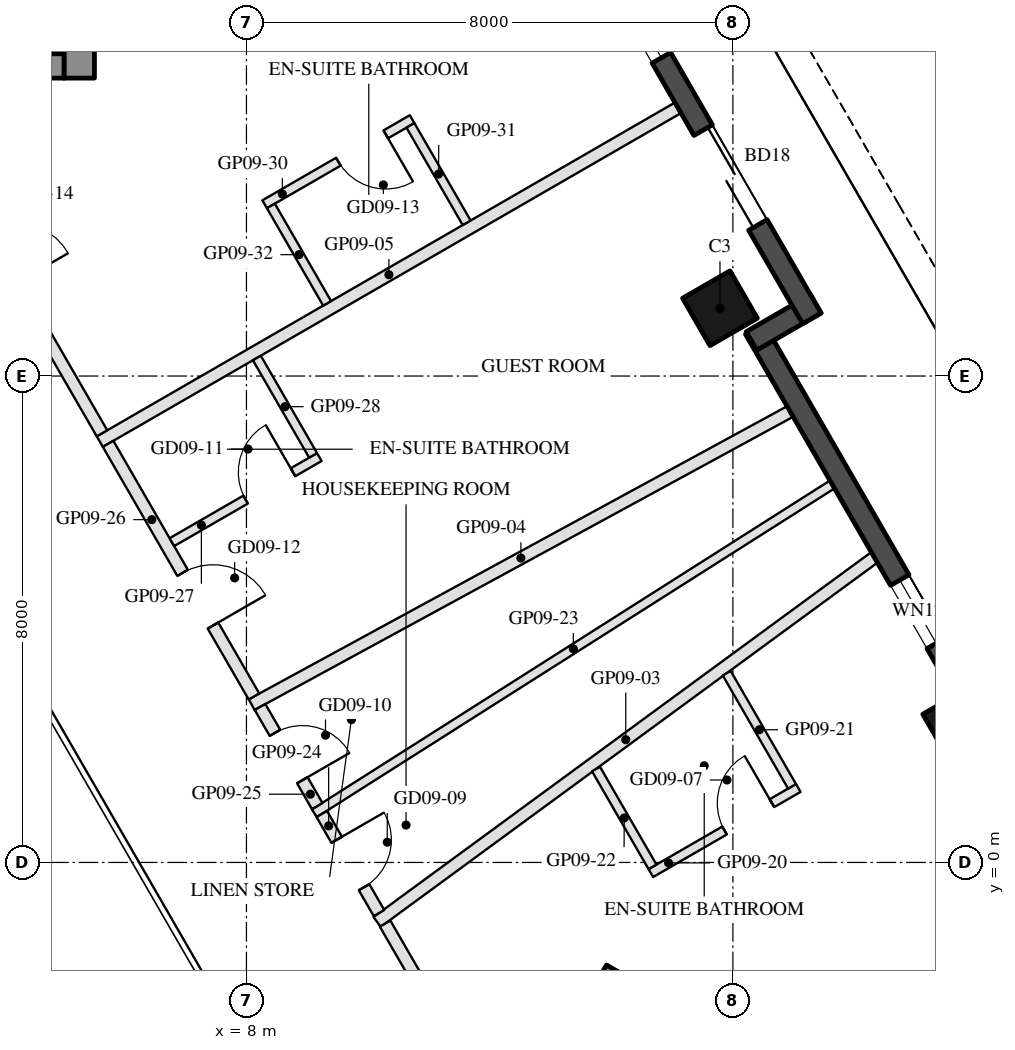
"""IFC4 building model, lengths in metres.
Left out: names, types, materials, properties, quantities, classifications, styles, units other than length and angle.
Written with IfcOpenShell. Run it as: python <this file> out.ifc"""

import sys

from ifc_helpers import new_model, si_unit, direction, frame, frame_2d, origin, origin_2d, place, context, subcontext, project, spatial, rectangle, hollow_rectangle, extrude, element, fill, save


model = new_model("IFC4")
c1 = context("Model", 3, precision=1e-05, world=origin(), true_north=direction((0.0, 1.0)))
c2 = subcontext(c1, "Body", "Model", "MODEL_VIEW")
j1 = project(units=[si_unit("LENGTHUNIT", "METRE"), si_unit("PLANEANGLEUNIT", "RADIAN")], contexts=[c1])
p1 = place(None, origin())
s1 = spatial("IfcSite", under=j1, at=p1, CompositionType="ELEMENT")
p2 = place(p1, origin())
s2 = spatial("IfcBuilding", under=s1, at=p2, CompositionType="ELEMENT")
p3 = place(p2, frame((0.0, 0.0, 109.4)))
s3 = spatial("IfcBuildingStorey", under=s2, at=p3, CompositionType="ELEMENT", Elevation=109.4)
for number, where, z_axis, x_axis in (
    (1, (19.738, 2.273, 0.0), (0.0, 0.0, 1.0), (-0.5, 0.866, 0.0)),
    (2, (15.788, 9.115, 0.0), (0.0, 0.0, 1.0), (-0.5, 0.866, 0.0)),
):
    element("IfcColumn", number, at=place(p3, frame(where, z_axis=z_axis, x_axis=x_axis)), inside=s3, PredefinedType="COLUMN", context=c2, shape_type="SweptSolid", body=[
        extrude(hollow_rectangle(XDim=0.9, YDim=0.9, WallThickness=0.04, at=origin_2d()), origin(), (0.0, 0.0, 1.0), 3.7),
    ])
p4 = place(p3, frame((19.729, 2.938, 0.0), z_axis=(0.0, 0.0, 1.0), x_axis=(-0.499976430342, 0.866039011305, 0.0)))
e3 = element("IfcWall", 3, at=p4, inside=s3, PredefinedType="SOLIDWALL", context=c2, shape_type="SweptSolid", body=[
    extrude(rectangle(XDim=6.74, YDim=0.35, at=frame_2d((3.37, 0.0))), origin(), (0.0, 0.0, 1.0), 3.55),
])
p5 = place(p4, frame((0.77, 0.0, 0.3)))
e4 = element("IfcOpeningElement", 4, at=p5, cuts=e3, PredefinedType="OPENING", context=c2, shape_type="SweptSolid", body=[
    extrude(rectangle(XDim=1.2, YDim=2.65, at=frame_2d((0.6, 1.325))), frame((0.0, 0.185, 0.0), z_axis=(0.0, -1.0, 0.0), x_axis=(1.0, 0.0, 0.0)), (0.0, 0.0, 1.0), 0.37),
])
p6 = place(p3, frame((16.306, 8.577, 0.0), z_axis=(0.0, 0.0, 1.0), x_axis=(0.866092288191, 0.499884134912, 0.0)))
e5 = element("IfcWall", 5, at=p6, inside=s3, PredefinedType="SOLIDWALL", context=c2, shape_type="SweptSolid", body=[
    extrude(rectangle(XDim=1.22, YDim=0.35, at=frame_2d((0.61, 0.0))), origin(), (0.0, 0.0, 1.0), 3.55),
])
p7 = place(p3, frame((17.299, 8.948, 0.0), z_axis=(0.0, 0.0, 1.0), x_axis=(-0.500010041276, 0.866019606374, 0.0)))
e6 = element("IfcWall", 6, at=p7, inside=s3, PredefinedType="SOLIDWALL", context=c2, shape_type="SweptSolid", body=[
    extrude(rectangle(XDim=9.7, YDim=0.35, at=frame_2d((4.85, 0.0))), origin(), (0.0, 0.0, 1.0), 3.55),
])
p8 = place(p7, frame((1.775, 0.0, 0.0)))
e7 = element("IfcOpeningElement", 7, at=p8, cuts=e6, PredefinedType="OPENING", context=c2, shape_type="SweptSolid", body=[
    extrude(rectangle(XDim=1.8, YDim=2.4, at=frame_2d((0.9, 1.2))), frame((0.0, 0.185, 0.0), z_axis=(0.0, -1.0, 0.0), x_axis=(1.0, 0.0, 0.0)), (0.0, 0.0, 1.0), 0.37),
])
p9 = place(p7, frame((4.949, 0.0, 0.3)))
e8 = element("IfcOpeningElement", 8, at=p9, cuts=e6, PredefinedType="OPENING", context=c2, shape_type="SweptSolid", body=[
    extrude(rectangle(XDim=3.0, YDim=2.65, at=frame_2d((1.5, 1.325))), frame((0.0, 0.185, 0.0), z_axis=(0.0, -1.0, 0.0), x_axis=(1.0, 0.0, 0.0)), (0.0, 0.0, 1.0), 0.37),
])
p10 = place(p3, frame((5.25, 12.9, 0.0), z_axis=(0.0, 0.0, 1.0), x_axis=(0.0, 1.0, 0.0)))
e9 = element("IfcWall", 9, at=p10, inside=s3, PredefinedType="SHEAR", context=c2, shape_type="SweptSolid", body=[
    extrude(rectangle(XDim=14.837, YDim=0.5, at=frame_2d((7.418, 0.0))), origin(), (0.0, 0.0, 1.0), 3.5),
])
p11 = place(p3, frame((5.0, 13.1, 0.0), z_axis=(0.0, 0.0, 1.0), x_axis=(-1.0, 0.0, 0.0)))
e10 = element("IfcWall", 10, at=p11, inside=s3, PredefinedType="SHEAR", context=c2, shape_type="SweptSolid", body=[
    extrude(rectangle(XDim=10.0, YDim=0.4, at=frame_2d((5.0, 0.0))), origin(), (0.0, 0.0, 1.0), 3.5),
])
p12 = place(p11, frame((3.55, 0.0, 0.0)))
e11 = element("IfcOpeningElement", 11, at=p12, cuts=e10, PredefinedType="OPENING", context=c2, shape_type="SweptSolid", body=[
    extrude(rectangle(XDim=1.1, YDim=2.1, at=frame_2d((0.55, 1.05))), frame((0.0, 0.21, 0.0), z_axis=(0.0, -1.0, 0.0), x_axis=(1.0, 0.0, 0.0)), (0.0, 0.0, 1.0), 0.42),
])
p13 = place(p11, frame((5.85, 0.0, 0.0)))
e12 = element("IfcOpeningElement", 12, at=p13, cuts=e10, PredefinedType="OPENING", context=c2, shape_type="SweptSolid", body=[
    extrude(rectangle(XDim=1.4, YDim=2.1, at=frame_2d((0.7, 1.05))), frame((0.0, 0.21, 0.0), z_axis=(0.0, -1.0, 0.0), x_axis=(1.0, 0.0, 0.0)), (0.0, 0.0, 1.0), 0.42),
])
p14 = place(p3, frame((13.797, -1.903, 0.0), z_axis=(0.0, 0.0, 1.0), x_axis=(0.866025009528, -0.500000682871, 0.0)))
e13 = element("IfcWall", 13, at=p14, inside=s3, PredefinedType="SHEAR", context=c2, shape_type="SweptSolid", body=[
    extrude(rectangle(XDim=14.837, YDim=0.5, at=frame_2d((7.418, 0.0))), origin(), (0.0, 0.0, 1.0), 3.5),
])
p15 = place(p3, frame((18.327, 5.017, 0.0), z_axis=(0.0, 0.0, 1.0), x_axis=(-0.806479235934, -0.59126241383, 0.0)))
e14 = element("IfcWall", 14, at=p15, inside=s3, PredefinedType="PARTITIONING", context=c2, shape_type="SweptSolid", body=[
    extrude(rectangle(XDim=10.14, YDim=0.2, at=frame_2d((5.07, 0.0))), origin(), (0.0, 0.0, 1.0), 2.96),
])
p16 = place(p3, frame((16.941, 7.417, 0.0), z_axis=(0.0, 0.0, 1.0), x_axis=(-0.878270052011, -0.478164946164, 0.0)))
e15 = element("IfcWall", 15, at=p16, inside=s3, PredefinedType="PARTITIONING", context=c2, shape_type="SweptSolid", body=[
    extrude(rectangle(XDim=10.083, YDim=0.2, at=frame_2d((5.042, 0.0))), origin(), (0.0, 0.0, 1.0), 2.96),
])
p17 = place(p3, frame((15.097, 12.411, 0.0), z_axis=(0.0, 0.0, 1.0), x_axis=(-0.866027479907, -0.499996404033, 0.0)))
e16 = element("IfcWall", 16, at=p17, inside=s3, PredefinedType="PARTITIONING", context=c2, shape_type="SweptSolid", body=[
    extrude(rectangle(XDim=10.98, YDim=0.2, at=frame_2d((5.49, 0.0))), origin(), (0.0, 0.0, 1.0), 2.96),
])
p18 = place(p3, frame((10.281, -1.006, 0.0), z_axis=(0.0, 0.0, 1.0), x_axis=(0.499995262016, -0.866028139243, 0.0)))
e17 = element("IfcWall", 17, at=p18, inside=s3, PredefinedType="PARTITIONING", context=c2, shape_type="SweptSolid", body=[
    extrude(rectangle(XDim=3.977, YDim=0.2, at=frame_2d((1.988, 0.0))), origin(), (0.0, 0.0, 1.0), 2.95),
])
p19 = place(p18, frame((1.488, 0.0, 0.0)))
e18 = element("IfcOpeningElement", 18, at=p19, cuts=e17, PredefinedType="OPENING", context=c2, shape_type="SweptSolid", body=[
    extrude(rectangle(XDim=1.0, YDim=2.1, at=frame_2d((0.5, 1.05))), frame((0.0, 0.11, 0.0), z_axis=(0.0, -1.0, 0.0), x_axis=(1.0, 0.0, 0.0)), (0.0, 0.0, 1.0), 0.22),
])
p20 = place(p3, frame((14.65, -0.175, 0.0), z_axis=(0.0, 0.0, 1.0), x_axis=(0.866034573852, 0.49998411664, 0.0)))
e19 = element("IfcWall", 19, at=p20, inside=s3, PredefinedType="PARTITIONING", context=c2, shape_type="SweptSolid", body=[
    extrude(rectangle(XDim=2.8, YDim=0.15, at=frame_2d((1.4, 0.0))), origin(), (0.0, 0.0, 1.0), 3.55),
])
p21 = place(p20, frame((1.4, 0.0, 0.0)))
e20 = element("IfcOpeningElement", 20, at=p21, cuts=e19, PredefinedType="OPENING", context=c2, shape_type="SweptSolid", body=[
    extrude(rectangle(XDim=0.9, YDim=2.1, at=frame_2d((0.45, 1.05))), frame((0.0, 0.085, 0.0), z_axis=(0.0, -1.0, 0.0), x_axis=(1.0, 0.0, 0.0)), (0.0, 0.0, 1.0), 0.17),
])
p22 = place(p3, frame((16.973, 1.252, 0.0), z_axis=(0.0, 0.0, 1.0), x_axis=(-0.499965131781, 0.866045534024, 0.0)))
e21 = element("IfcWall", 21, at=p22, inside=s3, PredefinedType="PARTITIONING", context=c2, shape_type="SweptSolid", body=[
    extrude(rectangle(XDim=2.148, YDim=0.15, at=frame_2d((1.074, 0.0))), origin(), (0.0, 0.0, 1.0), 3.55),
])
p23 = place(p3, frame((14.678, -0.073, 0.0), z_axis=(0.0, 0.0, 1.0), x_axis=(-0.499968895414, 0.866043361281, 0.0)))
e22 = element("IfcWall", 22, at=p23, inside=s3, PredefinedType="PARTITIONING", context=c2, shape_type="SweptSolid", body=[
    extrude(rectangle(XDim=1.858, YDim=0.15, at=frame_2d((0.929, 0.0))), origin(), (0.0, 0.0, 1.0), 3.55),
])
p24 = place(p3, frame((17.634, 6.217, 0.0), z_axis=(0.0, 0.0, 1.0), x_axis=(-0.844171272136, -0.536073561463, 0.0)))
e23 = element("IfcWall", 23, at=p24, inside=s3, PredefinedType="PARTITIONING", context=c2, shape_type="SweptSolid", body=[
    extrude(rectangle(XDim=10.089, YDim=0.15, at=frame_2d((5.044, 0.0))), origin(), (0.0, 0.0, 1.0), 2.95),
])
p25 = place(p3, frame((9.239, 0.797, 0.0), z_axis=(0.0, 0.0, 1.0), x_axis=(0.499992114976, -0.866029956157, 0.0)))
e24 = element("IfcWall", 24, at=p25, inside=s3, PredefinedType="PARTITIONING", context=c2, shape_type="SweptSolid", body=[
    extrude(rectangle(XDim=1.881, YDim=0.2, at=frame_2d((0.94, 0.0))), origin(), (0.0, 0.0, 1.0), 2.95),
])
p26 = place(p25, frame((0.49, 0.0, 0.0)))
e25 = element("IfcOpeningElement", 25, at=p26, cuts=e24, PredefinedType="OPENING", context=c2, shape_type="SweptSolid", body=[
    extrude(rectangle(XDim=0.9, YDim=2.1, at=frame_2d((0.45, 1.05))), frame((0.0, 0.11, 0.0), z_axis=(0.0, -1.0, 0.0), x_axis=(1.0, 0.0, 0.0)), (0.0, 0.0, 1.0), 0.22),
])
p27 = place(p3, frame((8.223, 2.557, 0.0), z_axis=(0.0, 0.0, 1.0), x_axis=(0.500018191375, -0.866014900734, 0.0)))
e26 = element("IfcWall", 26, at=p27, inside=s3, PredefinedType="PARTITIONING", context=c2, shape_type="SweptSolid", body=[
    extrude(rectangle(XDim=1.882, YDim=0.2, at=frame_2d((0.941, 0.0))), origin(), (0.0, 0.0, 1.0), 3.55),
])
p28 = place(p27, frame((0.491, 0.0, 0.0)))
e27 = element("IfcOpeningElement", 27, at=p28, cuts=e26, PredefinedType="OPENING", context=c2, shape_type="SweptSolid", body=[
    extrude(rectangle(XDim=0.9, YDim=2.1, at=frame_2d((0.45, 1.05))), frame((0.0, 0.11, 0.0), z_axis=(0.0, -1.0, 0.0), x_axis=(1.0, 0.0, 0.0)), (0.0, 0.0, 1.0), 0.22),
])
p29 = place(p3, frame((5.725, 6.885, 0.0), z_axis=(0.0, 0.0, 1.0), x_axis=(0.499986760557, -0.866033047446, 0.0)))
e28 = element("IfcWall", 28, at=p29, inside=s3, PredefinedType="PARTITIONING", context=c2, shape_type="SweptSolid", body=[
    extrude(rectangle(XDim=4.798, YDim=0.2, at=frame_2d((2.399, 0.0))), origin(), (0.0, 0.0, 1.0), 2.95),
])
p30 = place(p29, frame((2.45, 0.0, 0.0)))
e29 = element("IfcOpeningElement", 29, at=p30, cuts=e28, PredefinedType="OPENING", context=c2, shape_type="SweptSolid", body=[
    extrude(rectangle(XDim=1.0, YDim=2.1, at=frame_2d((0.5, 1.05))), frame((0.0, 0.11, 0.0), z_axis=(0.0, -1.0, 0.0), x_axis=(1.0, 0.0, 0.0)), (0.0, 0.0, 1.0), 0.22),
])
p31 = place(p3, frame((6.774, 5.268, 0.0), z_axis=(0.0, 0.0, 1.0), x_axis=(0.866034573852, 0.49998411664, 0.0)))
e30 = element("IfcWall", 30, at=p31, inside=s3, PredefinedType="PARTITIONING", context=c2, shape_type="SweptSolid", body=[
    extrude(rectangle(XDim=2.8, YDim=0.15, at=frame_2d((1.4, 0.0))), origin(), (0.0, 0.0, 1.0), 3.55),
])
p32 = place(p31, frame((1.4, 0.0, 0.0)))
e31 = element("IfcOpeningElement", 31, at=p32, cuts=e30, PredefinedType="OPENING", context=c2, shape_type="SweptSolid", body=[
    extrude(rectangle(XDim=0.9, YDim=2.1, at=frame_2d((0.45, 1.05))), frame((0.0, 0.085, 0.0), z_axis=(0.0, -1.0, 0.0), x_axis=(1.0, 0.0, 0.0)), (0.0, 0.0, 1.0), 0.17),
])
p33 = place(p3, frame((9.096, 6.695, 0.0), z_axis=(0.0, 0.0, 1.0), x_axis=(-0.500042316284, 0.866000971088, 0.0)))
e32 = element("IfcWall", 32, at=p33, inside=s3, PredefinedType="PARTITIONING", context=c2, shape_type="SweptSolid", body=[
    extrude(rectangle(XDim=1.85, YDim=0.15, at=frame_2d((0.925, 0.0))), origin(), (0.0, 0.0, 1.0), 3.55),
])
p34 = place(p3, frame((2.281, 12.85, 0.0), z_axis=(0.0, 0.0, 1.0), x_axis=(0.499982611572, -0.866035442765, 0.0)))
e33 = element("IfcWall", 33, at=p34, inside=s3, PredefinedType="PARTITIONING", context=c2, shape_type="SweptSolid", body=[
    extrude(rectangle(XDim=6.688, YDim=0.2, at=frame_2d((3.344, 0.0))), origin(), (0.0, 0.0, 1.0), 2.95),
])
p35 = place(p34, frame((2.844, 0.0, 0.0)))
e34 = element("IfcOpeningElement", 34, at=p35, cuts=e33, PredefinedType="OPENING", context=c2, shape_type="SweptSolid", body=[
    extrude(rectangle(XDim=1.0, YDim=2.1, at=frame_2d((0.5, 1.05))), frame((0.0, 0.11, 0.0), z_axis=(0.0, -1.0, 0.0), x_axis=(1.0, 0.0, 0.0)), (0.0, 0.0, 1.0), 0.22),
])
p36 = place(p3, frame((10.724, 12.225, 0.0), z_axis=(0.0, 0.0, 1.0), x_axis=(-0.866018616679, -0.500011755427, 0.0)))
e35 = element("IfcWall", 35, at=p36, inside=s3, PredefinedType="PARTITIONING", context=c2, shape_type="SweptSolid", body=[
    extrude(rectangle(XDim=2.8, YDim=0.15, at=frame_2d((1.4, 0.0))), origin(), (0.0, 0.0, 1.0), 3.55),
])
p37 = place(p36, frame((0.5, 0.0, 0.0)))
e36 = element("IfcOpeningElement", 36, at=p37, cuts=e35, PredefinedType="OPENING", context=c2, shape_type="SweptSolid", body=[
    extrude(rectangle(XDim=0.9, YDim=2.1, at=frame_2d((0.45, 1.05))), frame((0.0, 0.085, 0.0), z_axis=(0.0, -1.0, 0.0), x_axis=(1.0, 0.0, 0.0)), (0.0, 0.0, 1.0), 0.17),
])
p38 = place(p3, frame((11.622, 10.521, 0.0), z_axis=(0.0, 0.0, 1.0), x_axis=(-0.500042316284, 0.866000971088, 0.0)))
e37 = element("IfcWall", 37, at=p38, inside=s3, PredefinedType="PARTITIONING", context=c2, shape_type="SweptSolid", body=[
    extrude(rectangle(XDim=1.85, YDim=0.15, at=frame_2d((0.925, 0.0))), origin(), (0.0, 0.0, 1.0), 2.95),
])
p39 = place(p3, frame((9.327, 9.195, 0.0), z_axis=(0.0, 0.0, 1.0), x_axis=(-0.499985172903, 0.866033964044, 0.0)))
e38 = element("IfcWall", 38, at=p39, inside=s3, PredefinedType="PARTITIONING", context=c2, shape_type="SweptSolid", body=[
    extrude(rectangle(XDim=1.85, YDim=0.15, at=frame_2d((0.925, 0.0))), origin(), (0.0, 0.0, 1.0), 2.95),
])
p40 = place(p5, origin())
e39 = element("IfcWindow", 39, at=p40, inside=s3, PartitioningType="SINGLE_PANEL", PredefinedType="WINDOW", context=c2, shape_type="SweptSolid", body=[
    extrude(rectangle(XDim=1.2, YDim=2.65, at=frame_2d((0.6, 1.325))), frame((0.0, 0.03, 0.0), z_axis=(0.0, -1.0, 0.0), x_axis=(1.0, 0.0, 0.0)), (0.0, 0.0, 1.0), 0.06),
])
fill(e4, e39)
p41 = place(p8, frame((1.8, 0.0, 0.0), z_axis=(0.0, 0.0, 1.0), x_axis=(-1.0, 0.0, 0.0)))
e40 = element("IfcDoor", 40, at=p41, inside=s3, OperationType="SLIDING_TO_LEFT", PredefinedType="DOOR", context=c2, shape_type="SweptSolid", body=[
    extrude(rectangle(XDim=1.8, YDim=2.4, at=frame_2d((0.9, 1.2))), frame((0.0, 0.025, 0.0), z_axis=(0.0, -1.0, 0.0), x_axis=(1.0, 0.0, 0.0)), (0.0, 0.0, 1.0), 0.05),
])
fill(e7, e40)
p42 = place(p9, origin())
e41 = element("IfcWindow", 41, at=p42, inside=s3, PartitioningType="SINGLE_PANEL", PredefinedType="WINDOW", context=c2, shape_type="SweptSolid", body=[
    extrude(rectangle(XDim=3.0, YDim=2.65, at=frame_2d((1.5, 1.325))), frame((0.0, 0.03, 0.0), z_axis=(0.0, -1.0, 0.0), x_axis=(1.0, 0.0, 0.0)), (0.0, 0.0, 1.0), 0.06),
])
fill(e8, e41)
p43 = place(p21, origin())
e42 = element("IfcDoor", 42, at=p43, inside=s3, OperationType="SINGLE_SWING_RIGHT", PredefinedType="DOOR", context=c2, shape_type="SweptSolid", body=[
    extrude(rectangle(XDim=0.9, YDim=2.1, at=frame_2d((0.45, 1.05))), frame((0.0, 0.025, 0.0), z_axis=(0.0, -1.0, 0.0), x_axis=(1.0, 0.0, 0.0)), (0.0, 0.0, 1.0), 0.05),
])
fill(e20, e42)
p44 = place(p26, origin())
e43 = element("IfcDoor", 43, at=p44, inside=s3, OperationType="SINGLE_SWING_LEFT", PredefinedType="DOOR", context=c2, shape_type="SweptSolid", body=[
    extrude(rectangle(XDim=0.9, YDim=2.1, at=frame_2d((0.45, 1.05))), frame((0.0, 0.025, 0.0), z_axis=(0.0, -1.0, 0.0), x_axis=(1.0, 0.0, 0.0)), (0.0, 0.0, 1.0), 0.05),
])
fill(e25, e43)
p45 = place(p28, origin())
e44 = element("IfcDoor", 44, at=p45, inside=s3, OperationType="SINGLE_SWING_RIGHT", PredefinedType="DOOR", context=c2, shape_type="SweptSolid", body=[
    extrude(rectangle(XDim=0.9, YDim=2.1, at=frame_2d((0.45, 1.05))), frame((0.0, 0.025, 0.0), z_axis=(0.0, -1.0, 0.0), x_axis=(1.0, 0.0, 0.0)), (0.0, 0.0, 1.0), 0.05),
])
fill(e27, e44)
p46 = place(p32, origin())
e45 = element("IfcDoor", 45, at=p46, inside=s3, OperationType="SINGLE_SWING_RIGHT", PredefinedType="DOOR", context=c2, shape_type="SweptSolid", body=[
    extrude(rectangle(XDim=0.9, YDim=2.1, at=frame_2d((0.45, 1.05))), frame((0.0, 0.025, 0.0), z_axis=(0.0, -1.0, 0.0), x_axis=(1.0, 0.0, 0.0)), (0.0, 0.0, 1.0), 0.05),
])
fill(e31, e45)
p47 = place(p30, origin())
e46 = element("IfcDoor", 46, at=p47, inside=s3, OperationType="SINGLE_SWING_RIGHT", PredefinedType="DOOR", context=c2, shape_type="SweptSolid", body=[
    extrude(rectangle(XDim=1.0, YDim=2.1, at=frame_2d((0.5, 1.05))), frame((0.0, 0.025, 0.0), z_axis=(0.0, -1.0, 0.0), x_axis=(1.0, 0.0, 0.0)), (0.0, 0.0, 1.0), 0.05),
])
fill(e29, e46)
p48 = place(p37, origin())
e47 = element("IfcDoor", 47, at=p48, inside=s3, OperationType="SINGLE_SWING_LEFT", PredefinedType="DOOR", context=c2, shape_type="SweptSolid", body=[
    extrude(rectangle(XDim=0.9, YDim=2.1, at=frame_2d((0.45, 1.05))), frame((0.0, 0.025, 0.0), z_axis=(0.0, -1.0, 0.0), x_axis=(1.0, 0.0, 0.0)), (0.0, 0.0, 1.0), 0.05),
])
fill(e36, e47)
save(model, sys.argv[1])
